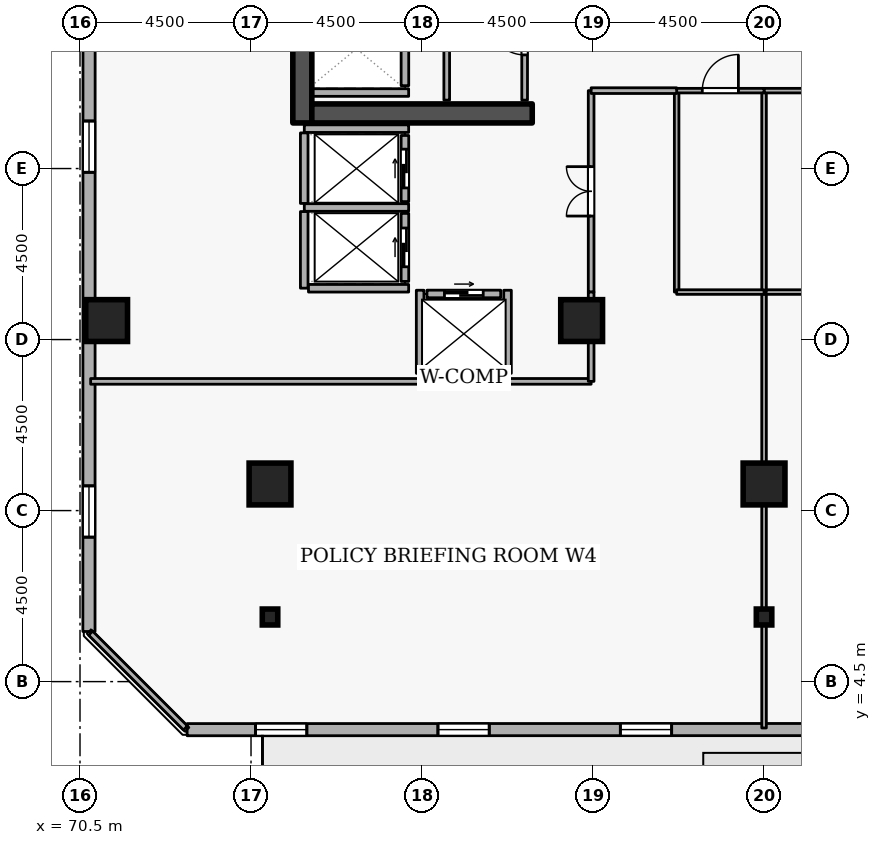
"""IFC4 building model, lengths in metres.
Left out: names, types, materials, properties, quantities, classifications, styles, units other than length and angle.
Written with IfcOpenShell. Run it as: python <this file> out.ifc"""

import sys

from ifc_helpers import new_model, si_unit, direction, frame, frame_2d, origin, origin_2d, place, context, subcontext, project, spatial, rectangle, i_section, extrude, element, fill, save


model = new_model("IFC4")
c1 = context("Model", 3, precision=1e-05, world=origin(), true_north=direction((0.0, 1.0)))
c2 = subcontext(c1, "Body", "Model", "MODEL_VIEW")
j1 = project(units=[si_unit("LENGTHUNIT", "METRE"), si_unit("PLANEANGLEUNIT", "RADIAN")], contexts=[c1])
p1 = place(None, origin())
s1 = spatial("IfcSite", under=j1, at=p1, CompositionType="ELEMENT")
p2 = place(p1, origin())
s2 = spatial("IfcBuilding", under=s1, at=p2, CompositionType="ELEMENT")
p3 = place(p2, frame((0.0, 0.0, 145.5)))
s3 = spatial("IfcBuildingStorey", under=s2, at=p3, CompositionType="ELEMENT", Elevation=145.5)
p4 = place(p3, frame((76.35, 19.2, 0.0), z_axis=(0.0, 0.0, 1.0), x_axis=(0.0, 1.0, 0.0)))
e1 = element("IfcWall", 1, at=p4, inside=s3, PredefinedType="SHEAR", context=c2, shape_type="SweptSolid", body=[
    extrude(rectangle(XDim=15.6, YDim=0.5, at=frame_2d((7.8, 0.0))), origin(), (0.0, 0.0, 1.0), 3.6),
])
p5 = place(p3, frame((76.6, 19.45, 0.0), z_axis=(0.0, 0.0, 1.0), x_axis=(1.0, 0.0, 0.0)))
e2 = element("IfcWall", 2, at=p5, inside=s3, PredefinedType="SHEAR", context=c2, shape_type="SweptSolid", body=[
    extrude(rectangle(XDim=5.8, YDim=0.5, at=frame_2d((2.9, 0.0))), origin(), (0.0, 0.0, 1.0), 3.6),
])
for number, where, z_axis, x_axis in (
    (3, (71.2, 14.0, 0.0), (0.0, 0.0, 1.0), (1.0, 0.0, 0.0)),
    (4, (88.5, 9.7, 0.0), (0.0, 0.0, 1.0), (1.0, 0.0, 0.0)),
    (5, (75.5, 9.7, 0.0), (0.0, 0.0, 1.0), (1.0, 0.0, 0.0)),
    (6, (83.7, 14.0, 0.0), (0.0, 0.0, 1.0), (1.0, 0.0, 0.0)),
):
    element("IfcColumn", number, at=place(p3, frame(where, z_axis=z_axis, x_axis=x_axis)), inside=s3, PredefinedType="COLUMN", context=c2, shape_type="SweptSolid", body=[
        extrude(rectangle(XDim=1.1, YDim=1.1, at=origin_2d()), origin(), (0.0, 0.0, 1.0), 3.6),
    ])
for number, where, z_axis, x_axis in (
    (7, (88.5, 6.2, 0.0), (0.0, 0.0, 1.0), (1.0, 0.0, 0.0)),
    (8, (75.5, 6.2, 0.0), (0.0, 0.0, 1.0), (1.0, 0.0, 0.0)),
):
    element("IfcColumn", number, at=place(p3, frame(where, z_axis=z_axis, x_axis=x_axis)), inside=s3, PredefinedType="COLUMN", context=c2, shape_type="SweptSolid", body=[
        extrude(i_section(OverallWidth=0.407, OverallDepth=0.419, WebThickness=0.031, FlangeThickness=0.049, FilletRadius=0.015, at=origin_2d()), origin(), (0.0, 0.0, 1.0), 3.6),
    ])
p6 = place(p3, frame((73.319, 3.235, 0.0), z_axis=(0.0, 0.0, 1.0), x_axis=(0.999999983007, 0.000184351399, 0.0)))
e9 = element("IfcWall", 9, at=p6, inside=s3, PredefinedType="STANDARD", context=c2, shape_type="SweptSolid", body=[
    extrude(rectangle(XDim=34.432, YDim=0.32, at=frame_2d((17.216, 0.0))), origin(), (0.0, 0.0, 1.0), 2.22),
])
p7 = place(p6, frame((19.016, 0.0, 0.0)))
e10 = element("IfcOpeningElement", 10, at=p7, cuts=e9, PredefinedType="OPENING", context=c2, shape_type="SweptSolid", body=[
    extrude(rectangle(XDim=1.0, YDim=2.08, at=frame_2d((0.5, 1.04))), frame((0.0, 0.17, 0.0), z_axis=(0.0, -1.0, 0.0), x_axis=(1.0, 0.0, 0.0)), (0.0, 0.0, 1.0), 0.34),
])
p8 = place(p6, frame((1.8, 0.0, 0.72)))
e11 = element("IfcOpeningElement", 11, at=p8, cuts=e9, PredefinedType="OPENING", context=c2, shape_type="SweptSolid", body=[
    extrude(rectangle(XDim=1.35, YDim=1.05, at=frame_2d((0.675, 0.525))), frame((0.0, 0.17, 0.0), z_axis=(0.0, -1.0, 0.0), x_axis=(1.0, 0.0, 0.0)), (0.0, 0.0, 1.0), 0.34),
])
p9 = place(p6, frame((6.6, 0.0, 0.72)))
e12 = element("IfcOpeningElement", 12, at=p9, cuts=e9, PredefinedType="OPENING", context=c2, shape_type="SweptSolid", body=[
    extrude(rectangle(XDim=1.35, YDim=1.05, at=frame_2d((0.675, 0.525))), frame((0.0, 0.17, 0.0), z_axis=(0.0, -1.0, 0.0), x_axis=(1.0, 0.0, 0.0)), (0.0, 0.0, 1.0), 0.34),
])
p10 = place(p6, frame((11.4, 0.0, 0.72)))
e13 = element("IfcOpeningElement", 13, at=p10, cuts=e9, PredefinedType="OPENING", context=c2, shape_type="SweptSolid", body=[
    extrude(rectangle(XDim=1.35, YDim=1.05, at=frame_2d((0.675, 0.525))), frame((0.0, 0.17, 0.0), z_axis=(0.0, -1.0, 0.0), x_axis=(1.0, 0.0, 0.0)), (0.0, 0.0, 1.0), 0.34),
])
p11 = place(p6, frame((16.2, 0.0, 0.72)))
e14 = element("IfcOpeningElement", 14, at=p11, cuts=e9, PredefinedType="OPENING", context=c2, shape_type="SweptSolid", body=[
    extrude(rectangle(XDim=1.35, YDim=1.05, at=frame_2d((0.675, 0.525))), frame((0.0, 0.17, 0.0), z_axis=(0.0, -1.0, 0.0), x_axis=(1.0, 0.0, 0.0)), (0.0, 0.0, 1.0), 0.34),
])
p12 = place(p6, frame((21.0, 0.0, 0.72)))
e15 = element("IfcOpeningElement", 15, at=p12, cuts=e9, PredefinedType="OPENING", context=c2, shape_type="SweptSolid", body=[
    extrude(rectangle(XDim=1.35, YDim=1.05, at=frame_2d((0.675, 0.525))), frame((0.0, 0.17, 0.0), z_axis=(0.0, -1.0, 0.0), x_axis=(1.0, 0.0, 0.0)), (0.0, 0.0, 1.0), 0.34),
])
p13 = place(p6, frame((25.8, 0.0, 0.72)))
e16 = element("IfcOpeningElement", 16, at=p13, cuts=e9, PredefinedType="OPENING", context=c2, shape_type="SweptSolid", body=[
    extrude(rectangle(XDim=1.35, YDim=1.05, at=frame_2d((0.675, 0.525))), frame((0.0, 0.17, 0.0), z_axis=(0.0, -1.0, 0.0), x_axis=(1.0, 0.0, 0.0)), (0.0, 0.0, 1.0), 0.34),
])
p14 = place(p6, frame((30.6, 0.0, 0.72)))
e17 = element("IfcOpeningElement", 17, at=p14, cuts=e9, PredefinedType="OPENING", context=c2, shape_type="SweptSolid", body=[
    extrude(rectangle(XDim=1.35, YDim=1.05, at=frame_2d((0.675, 0.525))), frame((0.0, 0.17, 0.0), z_axis=(0.0, -1.0, 0.0), x_axis=(1.0, 0.0, 0.0)), (0.0, 0.0, 1.0), 0.34),
])
p15 = place(p3, frame((70.742, 40.251, 0.0), z_axis=(0.0, 0.0, 1.0), x_axis=(-0.000184351399, -0.999999983007, 0.0)))
e18 = element("IfcWall", 18, at=p15, inside=s3, PredefinedType="STANDARD", context=c2, shape_type="SweptSolid", body=[
    extrude(rectangle(XDim=34.432, YDim=0.32, at=frame_2d((17.216, 0.0))), origin(), (0.0, 0.0, 1.0), 2.22),
])
p16 = place(p15, frame((6.6, 0.0, 0.72)))
e19 = element("IfcOpeningElement", 19, at=p16, cuts=e18, PredefinedType="OPENING", context=c2, shape_type="SweptSolid", body=[
    extrude(rectangle(XDim=1.35, YDim=1.05, at=frame_2d((0.675, 0.525))), frame((0.0, 0.17, 0.0), z_axis=(0.0, -1.0, 0.0), x_axis=(1.0, 0.0, 0.0)), (0.0, 0.0, 1.0), 0.34),
])
p17 = place(p15, frame((16.2, 0.0, 0.72)))
e20 = element("IfcOpeningElement", 20, at=p17, cuts=e18, PredefinedType="OPENING", context=c2, shape_type="SweptSolid", body=[
    extrude(rectangle(XDim=1.35, YDim=1.05, at=frame_2d((0.675, 0.525))), frame((0.0, 0.17, 0.0), z_axis=(0.0, -1.0, 0.0), x_axis=(1.0, 0.0, 0.0)), (0.0, 0.0, 1.0), 0.34),
])
p18 = place(p15, frame((21.0, 0.0, 0.72)))
e21 = element("IfcOpeningElement", 21, at=p18, cuts=e18, PredefinedType="OPENING", context=c2, shape_type="SweptSolid", body=[
    extrude(rectangle(XDim=1.35, YDim=1.05, at=frame_2d((0.675, 0.525))), frame((0.0, 0.17, 0.0), z_axis=(0.0, -1.0, 0.0), x_axis=(1.0, 0.0, 0.0)), (0.0, 0.0, 1.0), 0.34),
])
p19 = place(p15, frame((30.6, 0.0, 0.72)))
e22 = element("IfcOpeningElement", 22, at=p19, cuts=e18, PredefinedType="OPENING", context=c2, shape_type="SweptSolid", body=[
    extrude(rectangle(XDim=1.35, YDim=1.05, at=frame_2d((0.675, 0.525))), frame((0.0, 0.17, 0.0), z_axis=(0.0, -1.0, 0.0), x_axis=(1.0, 0.0, 0.0)), (0.0, 0.0, 1.0), 0.34),
])
p20 = place(p3, frame((79.05, 20.18, 0.0), z_axis=(0.0, 0.0, 1.0), x_axis=(0.0, 1.0, 0.0)))
e23 = element("IfcWall", 23, at=p20, inside=s3, PredefinedType="STANDARD", context=c2, shape_type="SweptSolid", body=[
    extrude(rectangle(XDim=1.94, YDim=0.2, at=frame_2d((0.97, 0.0))), origin(), (0.0, 0.0, 1.0), 3.3),
])
p21 = place(p3, frame((79.05, 17.13, 0.0), z_axis=(0.0, 0.0, 1.0), x_axis=(0.0, 1.0, 0.0)))
e24 = element("IfcWall", 24, at=p21, inside=s3, PredefinedType="STANDARD", context=c2, shape_type="SweptSolid", body=[
    extrude(rectangle(XDim=1.74, YDim=0.2, at=frame_2d((0.87, 0.0))), origin(), (0.0, 0.0, 1.0), 3.3),
])
p22 = place(p21, frame((0.36, 0.0, 0.0)))
e25 = element("IfcOpeningElement", 25, at=p22, cuts=e24, PredefinedType="OPENING", context=c2, shape_type="SweptSolid", body=[
    extrude(rectangle(XDim=1.02, YDim=2.06, at=frame_2d((0.51, 1.03))), frame((0.0, 0.11, 0.0), z_axis=(0.0, -1.0, 0.0), x_axis=(1.0, 0.0, 0.0)), (0.0, 0.0, 1.0), 0.22),
])
p23 = place(p3, frame((79.05, 15.03, 0.0), z_axis=(0.0, 0.0, 1.0), x_axis=(0.0, 1.0, 0.0)))
e26 = element("IfcWall", 26, at=p23, inside=s3, PredefinedType="STANDARD", context=c2, shape_type="SweptSolid", body=[
    extrude(rectangle(XDim=1.79, YDim=0.2, at=frame_2d((0.895, 0.0))), origin(), (0.0, 0.0, 1.0), 3.3),
])
p24 = place(p23, frame((0.385, 0.0, 0.0)))
e27 = element("IfcOpeningElement", 27, at=p24, cuts=e26, PredefinedType="OPENING", context=c2, shape_type="SweptSolid", body=[
    extrude(rectangle(XDim=1.02, YDim=2.06, at=frame_2d((0.51, 1.03))), frame((0.0, 0.11, 0.0), z_axis=(0.0, -1.0, 0.0), x_axis=(1.0, 0.0, 0.0)), (0.0, 0.0, 1.0), 0.22),
])
p25 = place(p3, frame((79.63, 14.7, 0.0), z_axis=(0.0, 0.0, 1.0), x_axis=(1.0, 0.0, 0.0)))
e28 = element("IfcWall", 28, at=p25, inside=s3, PredefinedType="STANDARD", context=c2, shape_type="SweptSolid", body=[
    extrude(rectangle(XDim=1.94, YDim=0.2, at=frame_2d((0.97, 0.0))), origin(), (0.0, 0.0, 1.0), 3.3),
])
p26 = place(p25, frame((0.46, 0.0, 0.0)))
e29 = element("IfcOpeningElement", 29, at=p26, cuts=e28, PredefinedType="OPENING", context=c2, shape_type="SweptSolid", body=[
    extrude(rectangle(XDim=1.02, YDim=2.06, at=frame_2d((0.51, 1.03))), frame((0.0, 0.11, 0.0), z_axis=(0.0, -1.0, 0.0), x_axis=(1.0, 0.0, 0.0)), (0.0, 0.0, 1.0), 0.22),
])
p27 = place(p3, frame((76.612, 20.0, 0.0), z_axis=(0.0, 0.0, 1.0), x_axis=(1.0, 0.0, 0.0)))
e30 = element("IfcWall", 30, at=p27, inside=s3, PredefinedType="STANDARD", context=c2, shape_type="SweptSolid", body=[
    extrude(rectangle(XDim=2.536, YDim=0.2, at=frame_2d((1.268, 0.0))), origin(), (0.0, 0.0, 1.0), 3.3),
])
p28 = place(p3, frame((76.402, 19.05, 0.0), z_axis=(0.0, 0.0, 1.0), x_axis=(1.0, 0.0, 0.0)))
e31 = element("IfcWall", 31, at=p28, inside=s3, PredefinedType="STANDARD", context=c2, shape_type="SweptSolid", body=[
    extrude(rectangle(XDim=2.746, YDim=0.2, at=frame_2d((1.373, 0.0))), origin(), (0.0, 0.0, 1.0), 2.505),
])
p29 = place(p3, frame((76.402, 16.975, 0.0), z_axis=(0.0, 0.0, 1.0), x_axis=(1.0, 0.0, 0.0)))
e32 = element("IfcWall", 32, at=p29, inside=s3, PredefinedType="STANDARD", context=c2, shape_type="SweptSolid", body=[
    extrude(rectangle(XDim=2.746, YDim=0.2, at=frame_2d((1.373, 0.0))), origin(), (0.0, 0.0, 1.0), 3.3),
])
p30 = place(p3, frame((76.4, 14.852, 0.0), z_axis=(0.0, 0.0, 1.0), x_axis=(0.0, 1.0, 0.0)))
e33 = element("IfcWall", 33, at=p30, inside=s3, PredefinedType="STANDARD", context=c2, shape_type="SweptSolid", body=[
    extrude(rectangle(XDim=2.016, YDim=0.2, at=frame_2d((1.008, 0.0))), origin(), (0.0, 0.0, 1.0), 3.3),
])
p31 = place(p3, frame((76.4, 17.082, 0.0), z_axis=(0.0, 0.0, 1.0), x_axis=(0.0, 1.0, 0.0)))
e34 = element("IfcWall", 34, at=p31, inside=s3, PredefinedType="STANDARD", context=c2, shape_type="SweptSolid", body=[
    extrude(rectangle(XDim=1.856, YDim=0.2, at=frame_2d((0.928, 0.0))), origin(), (0.0, 0.0, 1.0), 3.3),
])
p32 = place(p3, frame((76.512, 14.85, 0.0), z_axis=(0.0, 0.0, 1.0), x_axis=(1.0, 0.0, 0.0)))
e35 = element("IfcWall", 35, at=p32, inside=s3, PredefinedType="STANDARD", context=c2, shape_type="SweptSolid", body=[
    extrude(rectangle(XDim=2.636, YDim=0.2, at=frame_2d((1.318, 0.0))), origin(), (0.0, 0.0, 1.0), 3.3),
])
p33 = place(p3, frame((79.452, 12.5, 0.0), z_axis=(0.0, 0.0, 1.0), x_axis=(1.0, 0.0, 0.0)))
e36 = element("IfcWall", 36, at=p33, inside=s3, PredefinedType="STANDARD", context=c2, shape_type="SweptSolid", body=[
    extrude(rectangle(XDim=2.296, YDim=0.2, at=frame_2d((1.148, 0.0))), origin(), (0.0, 0.0, 1.0), 3.3),
])
for number, where, z_axis, x_axis in (
    (37, (81.75, 12.612, 0.0), (0.0, 0.0, 1.0), (0.0, 1.0, 0.0)),
    (38, (79.45, 12.612, 0.0), (0.0, 0.0, 1.0), (0.0, 1.0, 0.0)),
):
    element("IfcWall", number, at=place(p3, frame(where, z_axis=z_axis, x_axis=x_axis)), inside=s3, PredefinedType="STANDARD", context=c2, shape_type="SweptSolid", body=[
        extrude(rectangle(XDim=2.186, YDim=0.2, at=frame_2d((1.093, 0.0))), origin(), (0.0, 0.0, 1.0), 3.3),
    ])
p34 = place(p3, frame((82.2, 19.8, 0.0), z_axis=(0.0, 0.0, 1.0), x_axis=(0.0, 1.0, 0.0)))
e39 = element("IfcWall", 39, at=p34, inside=s3, PredefinedType="PARTITIONING", context=c2, shape_type="SweptSolid", body=[
    extrude(rectangle(XDim=3.3, YDim=0.15, at=frame_2d((1.65, 0.0))), origin(), (0.0, 0.0, 1.0), 3.3),
])
p35 = place(p34, frame((1.19, 0.0, 0.0)))
e40 = element("IfcOpeningElement", 40, at=p35, cuts=e39, PredefinedType="OPENING", context=c2, shape_type="SweptSolid", body=[
    extrude(rectangle(XDim=0.92, YDim=2.08, at=frame_2d((0.46, 1.04))), frame((0.0, 0.085, 0.0), z_axis=(0.0, -1.0, 0.0), x_axis=(1.0, 0.0, 0.0)), (0.0, 0.0, 1.0), 0.17),
])
p36 = place(p3, frame((80.15, 23.1, 0.0), z_axis=(0.0, 0.0, 1.0), x_axis=(0.0, -1.0, 0.0)))
e41 = element("IfcWall", 41, at=p36, inside=s3, PredefinedType="PARTITIONING", context=c2, shape_type="SweptSolid", body=[
    extrude(rectangle(XDim=3.3, YDim=0.15, at=frame_2d((1.65, 0.0))), origin(), (0.0, 0.0, 1.0), 3.3),
])
p37 = place(p3, frame((88.5, 3.28, 0.0), z_axis=(0.0, 0.0, 1.0), x_axis=(0.0, 1.0, 0.0)))
e42 = element("IfcWall", 42, at=p37, inside=s3, PredefinedType="PARTITIONING", context=c2, shape_type="SweptSolid", body=[
    extrude(rectangle(XDim=11.47, YDim=0.12, at=frame_2d((5.735, 0.0))), origin(), (0.0, 0.0, 1.0), 2.842),
])
p38 = place(p3, frame((88.5, 14.75, 0.0), z_axis=(0.0, 0.0, 1.0), x_axis=(1.0, 0.0, 0.0)))
e43 = element("IfcWall", 43, at=p38, inside=s3, PredefinedType="PARTITIONING", context=c2, shape_type="SweptSolid", body=[
    extrude(rectangle(XDim=4.55, YDim=0.12, at=frame_2d((2.275, 0.0))), origin(), (0.0, 0.0, 1.0), 3.3),
])
p39 = place(p3, frame((88.5, 14.75, 0.0), z_axis=(0.0, 0.0, 1.0), x_axis=(0.0, 1.0, 0.0)))
e44 = element("IfcWall", 44, at=p39, inside=s3, PredefinedType="PARTITIONING", context=c2, shape_type="SweptSolid", body=[
    extrude(rectangle(XDim=5.3, YDim=0.12, at=frame_2d((2.65, 0.0))), origin(), (0.0, 0.0, 1.0), 3.3),
])
p40 = place(p3, frame((88.5, 20.05, 0.0), z_axis=(0.0, 0.0, 1.0), x_axis=(1.0, 0.0, 0.0)))
e45 = element("IfcWall", 45, at=p40, inside=s3, PredefinedType="PARTITIONING", context=c2, shape_type="SweptSolid", body=[
    extrude(rectangle(XDim=4.55, YDim=0.12, at=frame_2d((2.275, 0.0))), origin(), (0.0, 0.0, 1.0), 3.3),
])
p41 = place(p3, frame((86.2, 14.75, 0.0), z_axis=(0.0, 0.0, 1.0), x_axis=(0.0, 1.0, 0.0)))
e46 = element("IfcWall", 46, at=p41, inside=s3, PredefinedType="PARTITIONING", context=c2, shape_type="SweptSolid", body=[
    extrude(rectangle(XDim=5.3, YDim=0.12, at=frame_2d((2.65, 0.0))), origin(), (0.0, 0.0, 1.0), 3.3),
])
p42 = place(p3, frame((86.2, 20.05, 0.0), z_axis=(0.0, 0.0, 1.0), x_axis=(1.0, 0.0, 0.0)))
e47 = element("IfcWall", 47, at=p42, inside=s3, PredefinedType="PARTITIONING", context=c2, shape_type="SweptSolid", body=[
    extrude(rectangle(XDim=2.3, YDim=0.12, at=frame_2d((1.15, 0.0))), origin(), (0.0, 0.0, 1.0), 3.3),
])
p43 = place(p42, frame((0.675, 0.0, 0.0)))
e48 = element("IfcOpeningElement", 48, at=p43, cuts=e47, PredefinedType="OPENING", context=c2, shape_type="SweptSolid", body=[
    extrude(rectangle(XDim=0.95, YDim=2.1, at=frame_2d((0.475, 1.05))), frame((0.0, 0.07, 0.0), z_axis=(0.0, -1.0, 0.0), x_axis=(1.0, 0.0, 0.0)), (0.0, 0.0, 1.0), 0.14),
])
p44 = place(p3, frame((88.5, 14.75, 0.0), z_axis=(0.0, 0.0, 1.0), x_axis=(-1.0, 0.0, 0.0)))
e49 = element("IfcWall", 49, at=p44, inside=s3, PredefinedType="PARTITIONING", context=c2, shape_type="SweptSolid", body=[
    extrude(rectangle(XDim=2.3, YDim=0.12, at=frame_2d((1.15, 0.0))), origin(), (0.0, 0.0, 1.0), 3.3),
])
p45 = place(p3, frame((83.95, 14.75, 0.0), z_axis=(0.0, 0.0, 1.0), x_axis=(0.0, 1.0, 0.0)))
e50 = element("IfcWall", 50, at=p45, inside=s3, PredefinedType="PARTITIONING", context=c2, shape_type="SweptSolid", body=[
    extrude(rectangle(XDim=5.3, YDim=0.15, at=frame_2d((2.65, 0.0))), origin(), (0.0, 0.0, 1.0), 3.3),
])
p46 = place(p45, frame((2.0, 0.0, 0.0)))
e51 = element("IfcOpeningElement", 51, at=p46, cuts=e50, PredefinedType="OPENING", context=c2, shape_type="SweptSolid", body=[
    extrude(rectangle(XDim=1.3, YDim=2.12, at=frame_2d((0.65, 1.06))), frame((0.0, 0.085, 0.0), z_axis=(0.0, -1.0, 0.0), x_axis=(1.0, 0.0, 0.0)), (0.0, 0.0, 1.0), 0.17),
])
p47 = place(p3, frame((83.95, 20.05, 0.0), z_axis=(0.0, 0.0, 1.0), x_axis=(1.0, 0.0, 0.0)))
e52 = element("IfcWall", 52, at=p47, inside=s3, PredefinedType="PARTITIONING", context=c2, shape_type="SweptSolid", body=[
    extrude(rectangle(XDim=2.25, YDim=0.15, at=frame_2d((1.125, 0.0))), origin(), (0.0, 0.0, 1.0), 3.3),
])
p48 = place(p3, frame((73.275, 3.28, 0.0), z_axis=(0.0, 0.0, 1.0), x_axis=(-0.707106781187, 0.707106781187, 0.0)))
e53 = element("IfcWall", 53, at=p48, inside=s3, PredefinedType="PARTITIONING", context=c2, shape_type="SweptSolid", body=[
    extrude(rectangle(XDim=3.528, YDim=0.15, at=frame_2d((1.764, 0.0))), origin(), (0.0, 0.0, 1.0), 3.3),
])
p49 = place(p3, frame((70.78, 12.4, 0.0), z_axis=(0.0, 0.0, 1.0), x_axis=(1.0, 0.0, 0.0)))
e54 = element("IfcWall", 54, at=p49, inside=s3, PredefinedType="PARTITIONING", context=c2, shape_type="SweptSolid", body=[
    extrude(rectangle(XDim=8.672, YDim=0.15, at=frame_2d((4.336, 0.0))), origin(), (0.0, 0.0, 1.0), 3.3),
])
p50 = place(p3, frame((81.748, 12.4, 0.0), z_axis=(0.0, 0.0, 1.0), x_axis=(1.0, 0.0, 0.0)))
e55 = element("IfcWall", 55, at=p50, inside=s3, PredefinedType="PARTITIONING", context=c2, shape_type="SweptSolid", body=[
    extrude(rectangle(XDim=2.202, YDim=0.15, at=frame_2d((1.101, 0.0))), origin(), (0.0, 0.0, 1.0), 3.3),
])
p51 = place(p3, frame((83.95, 12.4, 0.0), z_axis=(0.0, 0.0, 1.0), x_axis=(0.0, 1.0, 0.0)))
e56 = element("IfcWall", 56, at=p51, inside=s3, PredefinedType="PARTITIONING", context=c2, shape_type="SweptSolid", body=[
    extrude(rectangle(XDim=2.35, YDim=0.15, at=frame_2d((1.175, 0.0))), origin(), (0.0, 0.0, 1.0), 3.3),
])
p52 = place(p8, origin())
e57 = element("IfcWindow", 57, at=p52, inside=s3, PartitioningType="SINGLE_PANEL", PredefinedType="WINDOW", context=c2, shape_type="SweptSolid", body=[
    extrude(rectangle(XDim=1.35, YDim=1.05, at=frame_2d((0.675, 0.525))), frame((0.0, 0.03, 0.0), z_axis=(0.0, -1.0, 0.0), x_axis=(1.0, 0.0, 0.0)), (0.0, 0.0, 1.0), 0.06),
])
fill(e11, e57)
p53 = place(p9, origin())
e58 = element("IfcWindow", 58, at=p53, inside=s3, PartitioningType="SINGLE_PANEL", PredefinedType="WINDOW", context=c2, shape_type="SweptSolid", body=[
    extrude(rectangle(XDim=1.35, YDim=1.05, at=frame_2d((0.675, 0.525))), frame((0.0, 0.03, 0.0), z_axis=(0.0, -1.0, 0.0), x_axis=(1.0, 0.0, 0.0)), (0.0, 0.0, 1.0), 0.06),
])
fill(e12, e58)
p54 = place(p10, origin())
e59 = element("IfcWindow", 59, at=p54, inside=s3, PartitioningType="SINGLE_PANEL", PredefinedType="WINDOW", context=c2, shape_type="SweptSolid", body=[
    extrude(rectangle(XDim=1.35, YDim=1.05, at=frame_2d((0.675, 0.525))), frame((0.0, 0.03, 0.0), z_axis=(0.0, -1.0, 0.0), x_axis=(1.0, 0.0, 0.0)), (0.0, 0.0, 1.0), 0.06),
])
fill(e13, e59)
p55 = place(p18, origin())
e60 = element("IfcWindow", 60, at=p55, inside=s3, PartitioningType="SINGLE_PANEL", PredefinedType="WINDOW", context=c2, shape_type="SweptSolid", body=[
    extrude(rectangle(XDim=1.35, YDim=1.05, at=frame_2d((0.675, 0.525))), frame((0.0, 0.03, 0.0), z_axis=(0.0, -1.0, 0.0), x_axis=(1.0, 0.0, 0.0)), (0.0, 0.0, 1.0), 0.06),
])
fill(e21, e60)
p56 = place(p19, origin())
e61 = element("IfcWindow", 61, at=p56, inside=s3, PartitioningType="SINGLE_PANEL", PredefinedType="WINDOW", context=c2, shape_type="SweptSolid", body=[
    extrude(rectangle(XDim=1.35, YDim=1.05, at=frame_2d((0.675, 0.525))), frame((0.0, 0.03, 0.0), z_axis=(0.0, -1.0, 0.0), x_axis=(1.0, 0.0, 0.0)), (0.0, 0.0, 1.0), 0.06),
])
fill(e22, e61)
p57 = place(p22, origin())
e62 = element("IfcDoor", 62, at=p57, inside=s3, OperationType="SLIDING_TO_LEFT", PredefinedType="DOOR", context=c2, shape_type="SweptSolid", body=[
    extrude(rectangle(XDim=1.02, YDim=2.06, at=frame_2d((0.51, 1.03))), frame((0.0, 0.025, 0.0), z_axis=(0.0, -1.0, 0.0), x_axis=(1.0, 0.0, 0.0)), (0.0, 0.0, 1.0), 0.05),
])
fill(e25, e62)
p58 = place(p24, origin())
e63 = element("IfcDoor", 63, at=p58, inside=s3, OperationType="SLIDING_TO_LEFT", PredefinedType="DOOR", context=c2, shape_type="SweptSolid", body=[
    extrude(rectangle(XDim=1.02, YDim=2.06, at=frame_2d((0.51, 1.03))), frame((0.0, 0.025, 0.0), z_axis=(0.0, -1.0, 0.0), x_axis=(1.0, 0.0, 0.0)), (0.0, 0.0, 1.0), 0.05),
])
fill(e27, e63)
p59 = place(p26, origin())
e64 = element("IfcDoor", 64, at=p59, inside=s3, OperationType="SLIDING_TO_LEFT", PredefinedType="DOOR", context=c2, shape_type="SweptSolid", body=[
    extrude(rectangle(XDim=1.02, YDim=2.06, at=frame_2d((0.51, 1.03))), frame((0.0, 0.025, 0.0), z_axis=(0.0, -1.0, 0.0), x_axis=(1.0, 0.0, 0.0)), (0.0, 0.0, 1.0), 0.05),
])
fill(e29, e64)
p60 = place(p35, origin())
e65 = element("IfcDoor", 65, at=p60, inside=s3, OperationType="SINGLE_SWING_RIGHT", PredefinedType="DOOR", context=c2, shape_type="SweptSolid", body=[
    extrude(rectangle(XDim=0.92, YDim=2.08, at=frame_2d((0.46, 1.04))), frame((0.0, 0.025, 0.0), z_axis=(0.0, -1.0, 0.0), x_axis=(1.0, 0.0, 0.0)), (0.0, 0.0, 1.0), 0.05),
])
fill(e40, e65)
p61 = place(p43, origin())
e66 = element("IfcDoor", 66, at=p61, inside=s3, OperationType="SINGLE_SWING_RIGHT", PredefinedType="DOOR", context=c2, shape_type="SweptSolid", body=[
    extrude(rectangle(XDim=0.95, YDim=2.1, at=frame_2d((0.475, 1.05))), frame((0.0, 0.025, 0.0), z_axis=(0.0, -1.0, 0.0), x_axis=(1.0, 0.0, 0.0)), (0.0, 0.0, 1.0), 0.05),
])
fill(e48, e66)
p62 = place(p46, origin())
e67 = element("IfcDoor", 67, at=p62, inside=s3, OperationType="DOUBLE_DOOR_SINGLE_SWING", PredefinedType="DOOR", context=c2, shape_type="SweptSolid", body=[
    extrude(rectangle(XDim=1.3, YDim=2.12, at=frame_2d((0.65, 1.06))), frame((0.0, 0.025, 0.0), z_axis=(0.0, -1.0, 0.0), x_axis=(1.0, 0.0, 0.0)), (0.0, 0.0, 1.0), 0.05),
])
fill(e51, e67)
save(model, sys.argv[1])
